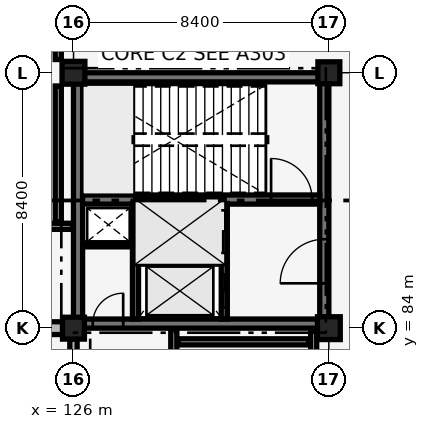
"""IFC4 building model, lengths in metres.
Left out: names, types, materials, properties, quantities, classifications, styles, units other than length and angle.
Written with IfcOpenShell. Run it as: python <this file> out.ifc"""

import sys

from ifc_helpers import new_model, si_unit, direction, frame, frame_2d, origin, origin_2d, place, context, subcontext, project, spatial, rectangle, extrude, element, fill, save


model = new_model("IFC4")
c1 = context("Model", 3, precision=1e-05, world=origin(), true_north=direction((0.0, 1.0)))
c2 = subcontext(c1, "Body", "Model", "MODEL_VIEW")
j1 = project(units=[si_unit("LENGTHUNIT", "METRE"), si_unit("PLANEANGLEUNIT", "RADIAN")], contexts=[c1])
p1 = place(None, origin())
s1 = spatial("IfcSite", under=j1, at=p1, CompositionType="ELEMENT")
p2 = place(p1, origin())
s2 = spatial("IfcBuilding", under=s1, at=p2, CompositionType="ELEMENT")
p3 = place(p2, origin())
s3 = spatial("IfcBuildingStorey", under=s2, at=p3, CompositionType="ELEMENT", Elevation=0.0)
p4 = place(p3, frame((126.15, 84.15, 0.0), z_axis=(0.0, 0.0, 1.0), x_axis=(1.0, 0.0, 0.0)))
e1 = element("IfcWall", 1, at=p4, inside=s3, PredefinedType="SHEAR", context=c2, shape_type="SweptSolid", body=[
    extrude(rectangle(XDim=8.1, YDim=0.3, at=frame_2d((4.05, 0.0))), origin(), (0.0, 0.0, 1.0), 5.14),
])
p5 = place(p4, frame((0.485, 0.0, 0.0)))
e2 = element("IfcOpeningElement", 2, at=p5, cuts=e1, PredefinedType="OPENING", context=c2, shape_type="SweptSolid", body=[
    extrude(rectangle(XDim=1.0, YDim=2.15, at=frame_2d((0.5, 1.075))), frame((0.0, 0.16, 0.0), z_axis=(0.0, -1.0, 0.0), x_axis=(1.0, 0.0, 0.0)), (0.0, 0.0, 1.0), 0.32),
])
for number, where, z_axis, x_axis in (
    (3, (126.15, 92.25, 0.0), (0.0, 0.0, 1.0), (1.0, 0.0, 0.0)),
    (4, (126.15, 84.15, 0.0), (0.0, 0.0, 1.0), (0.0, 1.0, 0.0)),
):
    element("IfcWall", number, at=place(p3, frame(where, z_axis=z_axis, x_axis=x_axis)), inside=s3, PredefinedType="SHEAR", context=c2, shape_type="SweptSolid", body=[
        extrude(rectangle(XDim=8.1, YDim=0.3, at=frame_2d((4.05, 0.0))), origin(), (0.0, 0.0, 1.0), 5.14),
    ])
p6 = place(p3, frame((134.25, 84.15, 0.0), z_axis=(0.0, 0.0, 1.0), x_axis=(0.0, 1.0, 0.0)))
e5 = element("IfcWall", 5, at=p6, inside=s3, PredefinedType="SHEAR", context=c2, shape_type="SweptSolid", body=[
    extrude(rectangle(XDim=8.1, YDim=0.3, at=frame_2d((4.05, 0.0))), origin(), (0.0, 0.0, 1.0), 5.14),
])
p7 = place(p6, frame((1.325, 0.0, 0.0)))
e6 = element("IfcOpeningElement", 6, at=p7, cuts=e5, PredefinedType="OPENING", context=c2, shape_type="SweptSolid", body=[
    extrude(rectangle(XDim=1.45, YDim=2.15, at=frame_2d((0.725, 1.075))), frame((0.0, 0.16, 0.0), z_axis=(0.0, -1.0, 0.0), x_axis=(1.0, 0.0, 0.0)), (0.0, 0.0, 1.0), 0.32),
])
p8 = place(p3, frame((126.3, 88.23, 0.0), z_axis=(0.0, 0.0, 1.0), x_axis=(1.0, 0.0, 0.0)))
e7 = element("IfcWall", 7, at=p8, inside=s3, PredefinedType="SHEAR", context=c2, shape_type="SweptSolid", body=[
    extrude(rectangle(XDim=7.8, YDim=0.3, at=frame_2d((3.9, 0.0))), origin(), (0.0, 0.0, 1.0), 5.14),
])
p9 = place(p8, frame((6.2, 0.0, 0.0)))
e8 = element("IfcOpeningElement", 8, at=p9, cuts=e7, PredefinedType="OPENING", context=c2, shape_type="SweptSolid", body=[
    extrude(rectangle(XDim=1.35, YDim=2.15, at=frame_2d((0.675, 1.075))), frame((0.0, 0.16, 0.0), z_axis=(0.0, -1.0, 0.0), x_axis=(1.0, 0.0, 0.0)), (0.0, 0.0, 1.0), 0.32),
])
p10 = place(p3, frame((126.0, 84.0, 0.0), z_axis=(0.0, 0.0, 1.0), x_axis=(1.0, 0.0, 0.0)))
e9 = element("IfcColumn", 9, at=p10, inside=s3, PredefinedType="COLUMN", context=c2, shape_type="SweptSolid", body=[
    extrude(rectangle(XDim=0.72, YDim=0.72, at=origin_2d()), origin(), (0.0, 0.0, 1.0), 5.14),
])
for number, where, z_axis, x_axis in (
    (10, (126.0, 92.4, 0.0), (0.0, 0.0, 1.0), (1.0, 0.0, 0.0)),
    (11, (134.4, 84.0, 0.0), (0.0, 0.0, 1.0), (1.0, 0.0, 0.0)),
):
    element("IfcColumn", number, at=place(p3, frame(where, z_axis=z_axis, x_axis=x_axis)), inside=s3, PredefinedType="COLUMN", context=c2, shape_type="SweptSolid", body=[
        extrude(rectangle(XDim=0.75, YDim=0.75, at=origin_2d()), origin(), (0.0, 0.0, 1.0), 5.14),
    ])
p11 = place(p3, frame((134.4, 92.4, 0.0), z_axis=(0.0, 0.0, 1.0), x_axis=(1.0, 0.0, 0.0)))
e12 = element("IfcColumn", 12, at=p11, inside=s3, PredefinedType="COLUMN", context=c2, shape_type="SweptSolid", body=[
    extrude(rectangle(XDim=0.72, YDim=0.72, at=origin_2d()), origin(), (0.0, 0.0, 1.0), 5.14),
])
p12 = place(p3, frame((117.935, 84.0, 0.0), z_axis=(0.0, 0.0, 1.0), x_axis=(1.0, 0.0, 0.0)))
e13 = element("IfcWall", 13, at=p12, inside=s3, PredefinedType="SOLIDWALL", context=c2, shape_type="SweptSolid", body=[
    extrude(rectangle(XDim=7.72, YDim=0.42, at=frame_2d((3.86, 0.0))), origin(), (0.0, 0.0, 1.0), 4.4),
])
p13 = place(p12, frame((1.077, 0.0, 0.75)))
e14 = element("IfcOpeningElement", 14, at=p13, cuts=e13, PredefinedType="OPENING", context=c2, shape_type="SweptSolid", body=[
    extrude(rectangle(XDim=0.78, YDim=2.35, at=frame_2d((0.39, 1.175))), frame((0.0, 0.22, 0.0), z_axis=(0.0, -1.0, 0.0), x_axis=(1.0, 0.0, 0.0)), (0.0, 0.0, 1.0), 0.44),
])
p14 = place(p12, frame((2.621, 0.0, 0.75)))
e15 = element("IfcOpeningElement", 15, at=p14, cuts=e13, PredefinedType="OPENING", context=c2, shape_type="SweptSolid", body=[
    extrude(rectangle(XDim=0.78, YDim=2.35, at=frame_2d((0.39, 1.175))), frame((0.0, 0.22, 0.0), z_axis=(0.0, -1.0, 0.0), x_axis=(1.0, 0.0, 0.0)), (0.0, 0.0, 1.0), 0.44),
])
p15 = place(p12, frame((4.319, 0.0, 0.75)))
e16 = element("IfcOpeningElement", 16, at=p15, cuts=e13, PredefinedType="OPENING", context=c2, shape_type="SweptSolid", body=[
    extrude(rectangle(XDim=0.78, YDim=2.35, at=frame_2d((0.39, 1.175))), frame((0.0, 0.22, 0.0), z_axis=(0.0, -1.0, 0.0), x_axis=(1.0, 0.0, 0.0)), (0.0, 0.0, 1.0), 0.44),
])
p16 = place(p12, frame((5.863, 0.0, 0.75)))
e17 = element("IfcOpeningElement", 17, at=p16, cuts=e13, PredefinedType="OPENING", context=c2, shape_type="SweptSolid", body=[
    extrude(rectangle(XDim=0.78, YDim=2.35, at=frame_2d((0.39, 1.175))), frame((0.0, 0.22, 0.0), z_axis=(0.0, -1.0, 0.0), x_axis=(1.0, 0.0, 0.0)), (0.0, 0.0, 1.0), 0.44),
])
p17 = place(p3, frame((126.0, 75.96, 0.0), z_axis=(0.0, 0.0, 1.0), x_axis=(0.0, 1.0, 0.0)))
e18 = element("IfcWall", 18, at=p17, inside=s3, PredefinedType="SOLIDWALL", context=c2, shape_type="SweptSolid", body=[
    extrude(rectangle(XDim=7.695, YDim=0.24, at=frame_2d((3.848, 0.0))), origin(), (0.0, 0.0, 1.0), 4.39),
])
p18 = place(p17, frame((0.79, 0.0, 0.35)))
e19 = element("IfcOpeningElement", 19, at=p18, cuts=e18, PredefinedType="OPENING", context=c2, shape_type="SweptSolid", body=[
    extrude(rectangle(XDim=0.44, YDim=1.25, at=frame_2d((0.22, 0.625))), frame((0.0, 0.13, 0.0), z_axis=(0.0, -1.0, 0.0), x_axis=(1.0, 0.0, 0.0)), (0.0, 0.0, 1.0), 0.26),
])
p19 = place(p17, frame((2.208, 0.0, 0.35)))
e20 = element("IfcOpeningElement", 20, at=p19, cuts=e18, PredefinedType="OPENING", context=c2, shape_type="SweptSolid", body=[
    extrude(rectangle(XDim=0.44, YDim=1.25, at=frame_2d((0.22, 0.625))), frame((0.0, 0.13, 0.0), z_axis=(0.0, -1.0, 0.0), x_axis=(1.0, 0.0, 0.0)), (0.0, 0.0, 1.0), 0.26),
])
p20 = place(p17, frame((3.627, 0.0, 0.35)))
e21 = element("IfcOpeningElement", 21, at=p20, cuts=e18, PredefinedType="OPENING", context=c2, shape_type="SweptSolid", body=[
    extrude(rectangle(XDim=0.44, YDim=1.25, at=frame_2d((0.22, 0.625))), frame((0.0, 0.13, 0.0), z_axis=(0.0, -1.0, 0.0), x_axis=(1.0, 0.0, 0.0)), (0.0, 0.0, 1.0), 0.26),
])
p21 = place(p17, frame((5.046, 0.0, 0.35)))
e22 = element("IfcOpeningElement", 22, at=p21, cuts=e18, PredefinedType="OPENING", context=c2, shape_type="SweptSolid", body=[
    extrude(rectangle(XDim=0.44, YDim=1.25, at=frame_2d((0.22, 0.625))), frame((0.0, 0.13, 0.0), z_axis=(0.0, -1.0, 0.0), x_axis=(1.0, 0.0, 0.0)), (0.0, 0.0, 1.0), 0.26),
])
p22 = place(p17, frame((6.466, 0.0, 0.35)))
e23 = element("IfcOpeningElement", 23, at=p22, cuts=e18, PredefinedType="OPENING", context=c2, shape_type="SweptSolid", body=[
    extrude(rectangle(XDim=0.44, YDim=1.25, at=frame_2d((0.22, 0.625))), frame((0.0, 0.13, 0.0), z_axis=(0.0, -1.0, 0.0), x_axis=(1.0, 0.0, 0.0)), (0.0, 0.0, 1.0), 0.26),
])
p23 = place(p17, frame((0.79, 0.0, 1.8)))
e24 = element("IfcOpeningElement", 24, at=p23, cuts=e18, PredefinedType="OPENING", context=c2, shape_type="SweptSolid", body=[
    extrude(rectangle(XDim=0.44, YDim=1.25, at=frame_2d((0.22, 0.625))), frame((0.0, 0.13, 0.0), z_axis=(0.0, -1.0, 0.0), x_axis=(1.0, 0.0, 0.0)), (0.0, 0.0, 1.0), 0.26),
])
p24 = place(p17, frame((2.208, 0.0, 1.8)))
e25 = element("IfcOpeningElement", 25, at=p24, cuts=e18, PredefinedType="OPENING", context=c2, shape_type="SweptSolid", body=[
    extrude(rectangle(XDim=0.44, YDim=1.25, at=frame_2d((0.22, 0.625))), frame((0.0, 0.13, 0.0), z_axis=(0.0, -1.0, 0.0), x_axis=(1.0, 0.0, 0.0)), (0.0, 0.0, 1.0), 0.26),
])
p25 = place(p17, frame((3.627, 0.0, 1.8)))
e26 = element("IfcOpeningElement", 26, at=p25, cuts=e18, PredefinedType="OPENING", context=c2, shape_type="SweptSolid", body=[
    extrude(rectangle(XDim=0.44, YDim=1.25, at=frame_2d((0.22, 0.625))), frame((0.0, 0.13, 0.0), z_axis=(0.0, -1.0, 0.0), x_axis=(1.0, 0.0, 0.0)), (0.0, 0.0, 1.0), 0.26),
])
p26 = place(p17, frame((5.046, 0.0, 1.8)))
e27 = element("IfcOpeningElement", 27, at=p26, cuts=e18, PredefinedType="OPENING", context=c2, shape_type="SweptSolid", body=[
    extrude(rectangle(XDim=0.44, YDim=1.25, at=frame_2d((0.22, 0.625))), frame((0.0, 0.13, 0.0), z_axis=(0.0, -1.0, 0.0), x_axis=(1.0, 0.0, 0.0)), (0.0, 0.0, 1.0), 0.26),
])
p27 = place(p17, frame((6.466, 0.0, 1.8)))
e28 = element("IfcOpeningElement", 28, at=p27, cuts=e18, PredefinedType="OPENING", context=c2, shape_type="SweptSolid", body=[
    extrude(rectangle(XDim=0.44, YDim=1.25, at=frame_2d((0.22, 0.625))), frame((0.0, 0.13, 0.0), z_axis=(0.0, -1.0, 0.0), x_axis=(1.0, 0.0, 0.0)), (0.0, 0.0, 1.0), 0.26),
])
p28 = place(p3, frame((130.96, 84.3, 0.0), z_axis=(0.0, 0.0, 1.0), x_axis=(0.0, 1.0, 0.0)))
e29 = element("IfcWall", 29, at=p28, inside=s3, PredefinedType="SHEAR", context=c2, shape_type="SweptSolid", body=[
    extrude(rectangle(XDim=3.8, YDim=0.2, at=frame_2d((1.9, 0.0))), origin(), (0.0, 0.0, 1.0), 4.36),
])
p29 = place(p28, frame((0.375, 0.0, 0.0)))
e30 = element("IfcOpeningElement", 30, at=p29, cuts=e29, PredefinedType="OPENING", context=c2, shape_type="SweptSolid", body=[
    extrude(rectangle(XDim=1.1, YDim=2.15, at=frame_2d((0.55, 1.075))), frame((0.0, 0.11, 0.0), z_axis=(0.0, -1.0, 0.0), x_axis=(1.0, 0.0, 0.0)), (0.0, 0.0, 1.0), 0.22),
])
p30 = place(p28, frame((2.175, 0.0, 0.0)))
e31 = element("IfcOpeningElement", 31, at=p30, cuts=e29, PredefinedType="OPENING", context=c2, shape_type="SweptSolid", body=[
    extrude(rectangle(XDim=1.4, YDim=2.2, at=frame_2d((0.7, 1.1))), frame((0.0, 0.11, 0.0), z_axis=(0.0, -1.0, 0.0), x_axis=(1.0, 0.0, 0.0)), (0.0, 0.0, 1.0), 0.22),
])
p31 = place(p3, frame((128.04, 84.3, 0.0), z_axis=(0.0, 0.0, 1.0), x_axis=(0.0, 1.0, 0.0)))
e32 = element("IfcWall", 32, at=p31, inside=s3, PredefinedType="SHEAR", context=c2, shape_type="SweptSolid", body=[
    extrude(rectangle(XDim=3.8, YDim=0.2, at=frame_2d((1.9, 0.0))), origin(), (0.0, 0.0, 1.0), 4.36),
])
p32 = place(p3, frame((128.15, 86.2, 0.0), z_axis=(0.0, 0.0, 1.0), x_axis=(1.0, 0.0, 0.0)))
e33 = element("IfcWall", 33, at=p32, inside=s3, PredefinedType="SHEAR", context=c2, shape_type="SweptSolid", body=[
    extrude(rectangle(XDim=2.7, YDim=0.18, at=frame_2d((1.35, 0.0))), origin(), (0.0, 0.0, 1.0), 5.14),
])
p33 = place(p3, frame((126.32, 86.74, 0.0), z_axis=(0.0, 0.0, 1.0), x_axis=(1.0, 0.0, 0.0)))
e34 = element("IfcWall", 34, at=p33, inside=s3, PredefinedType="PARTITIONING", context=c2, shape_type="SweptSolid", body=[
    extrude(rectangle(XDim=1.62, YDim=0.13, at=frame_2d((0.81, 0.0))), origin(), (0.0, 0.0, 1.0), 5.14),
])
p34 = place(p3, frame((129.45, 83.55, 0.0), z_axis=(0.0, 0.0, 1.0), x_axis=(1.0, 0.0, 0.0)))
e35 = element("IfcWall", 35, at=p34, inside=s3, PredefinedType="PARTITIONING", context=c2, shape_type="SweptSolid", body=[
    extrude(rectangle(XDim=4.3, YDim=0.2, at=frame_2d((2.15, 0.0))), origin(), (0.0, 0.0, 1.0), 5.14),
])
p35 = place(p3, frame((129.3, 36.7, 0.0), z_axis=(0.0, 0.0, 1.0), x_axis=(0.0, 1.0, 0.0)))
e36 = element("IfcWall", 36, at=p35, inside=s3, PredefinedType="PARTITIONING", context=c2, shape_type="SweptSolid", body=[
    extrude(rectangle(XDim=47.27, YDim=0.2, at=frame_2d((23.635, 0.0))), origin(), (0.0, 0.0, 1.0), 4.36),
])
p36 = place(p3, frame((133.9, 76.02, 0.0), z_axis=(0.0, 0.0, 1.0), x_axis=(0.0, 1.0, 0.0)))
e37 = element("IfcWall", 37, at=p36, inside=s3, PredefinedType="PARTITIONING", context=c2, shape_type="SweptSolid", body=[
    extrude(rectangle(XDim=7.95, YDim=0.2, at=frame_2d((3.975, 0.0))), origin(), (0.0, 0.0, 1.0), 4.36),
])
p37 = place(p3, frame((109.23, 87.35, 0.0), z_axis=(0.0, 0.0, 1.0), x_axis=(1.0, 0.0, 0.0)))
e38 = element("IfcWall", 38, at=p37, inside=s3, PredefinedType="PARTITIONING", context=c2, shape_type="SweptSolid", body=[
    extrude(rectangle(XDim=16.74, YDim=0.2, at=frame_2d((8.37, 0.0))), origin(), (0.0, 0.0, 1.0), 4.49),
])
p38 = place(p37, frame((7.62, 0.0, 0.0)))
e39 = element("IfcOpeningElement", 39, at=p38, cuts=e38, PredefinedType="OPENING", context=c2, shape_type="SweptSolid", body=[
    extrude(rectangle(XDim=1.5, YDim=2.2, at=frame_2d((0.75, 1.1))), frame((0.0, 0.11, 0.0), z_axis=(0.0, -1.0, 0.0), x_axis=(1.0, 0.0, 0.0)), (0.0, 0.0, 1.0), 0.22),
])
p39 = place(p3, frame((125.5, 87.5, 0.0), z_axis=(0.0, 0.0, 1.0), x_axis=(0.0, 1.0, 0.0)))
e40 = element("IfcWall", 40, at=p39, inside=s3, PredefinedType="PARTITIONING", context=c2, shape_type="SweptSolid", body=[
    extrude(rectangle(XDim=4.465, YDim=0.2, at=frame_2d((2.232, 0.0))), origin(), (0.0, 0.0, 1.0), 4.59),
])
p40 = place(p3, frame((125.5, 92.835, 0.0), z_axis=(0.0, 0.0, 1.0), x_axis=(0.0, 1.0, 0.0)))
e41 = element("IfcWall", 41, at=p40, inside=s3, PredefinedType="PARTITIONING", context=c2, shape_type="SweptSolid", body=[
    extrude(rectangle(XDim=7.545, YDim=0.2, at=frame_2d((3.772, 0.0))), origin(), (0.0, 0.0, 1.0), 4.58),
])
p41 = place(p9, origin())
e42 = element("IfcDoor", 42, at=p41, inside=s3, OperationType="SINGLE_SWING_LEFT", PredefinedType="DOOR", context=c2, shape_type="SweptSolid", body=[
    extrude(rectangle(XDim=1.35, YDim=2.15, at=frame_2d((0.675, 1.075))), frame((0.0, 0.025, 0.0), z_axis=(0.0, -1.0, 0.0), x_axis=(1.0, 0.0, 0.0)), (0.0, 0.0, 1.0), 0.05),
])
fill(e8, e42)
p42 = place(p29, origin())
e43 = element("IfcDoor", 43, at=p42, inside=s3, OperationType="SLIDING_TO_LEFT", PredefinedType="DOOR", context=c2, shape_type="SweptSolid", body=[
    extrude(rectangle(XDim=1.1, YDim=2.15, at=frame_2d((0.55, 1.075))), frame((0.0, 0.025, 0.0), z_axis=(0.0, -1.0, 0.0), x_axis=(1.0, 0.0, 0.0)), (0.0, 0.0, 1.0), 0.05),
])
fill(e30, e43)
p43 = place(p30, origin())
e44 = element("IfcDoor", 44, at=p43, inside=s3, OperationType="SLIDING_TO_LEFT", PredefinedType="DOOR", context=c2, shape_type="SweptSolid", body=[
    extrude(rectangle(XDim=1.4, YDim=2.2, at=frame_2d((0.7, 1.1))), frame((0.0, 0.025, 0.0), z_axis=(0.0, -1.0, 0.0), x_axis=(1.0, 0.0, 0.0)), (0.0, 0.0, 1.0), 0.05),
])
fill(e31, e44)
p44 = place(p7, origin())
e45 = element("IfcDoor", 45, at=p44, inside=s3, OperationType="DOUBLE_DOOR_SINGLE_SWING", PredefinedType="DOOR", context=c2, shape_type="SweptSolid", body=[
    extrude(rectangle(XDim=1.45, YDim=2.15, at=frame_2d((0.725, 1.075))), frame((0.0, 0.025, 0.0), z_axis=(0.0, -1.0, 0.0), x_axis=(1.0, 0.0, 0.0)), (0.0, 0.0, 1.0), 0.05),
])
fill(e6, e45)
p45 = place(p5, origin())
e46 = element("IfcDoor", 46, at=p45, inside=s3, OperationType="SINGLE_SWING_RIGHT", PredefinedType="DOOR", context=c2, shape_type="SweptSolid", body=[
    extrude(rectangle(XDim=1.0, YDim=2.15, at=frame_2d((0.5, 1.075))), frame((0.0, 0.025, 0.0), z_axis=(0.0, -1.0, 0.0), x_axis=(1.0, 0.0, 0.0)), (0.0, 0.0, 1.0), 0.05),
])
fill(e2, e46)
save(model, sys.argv[1])
